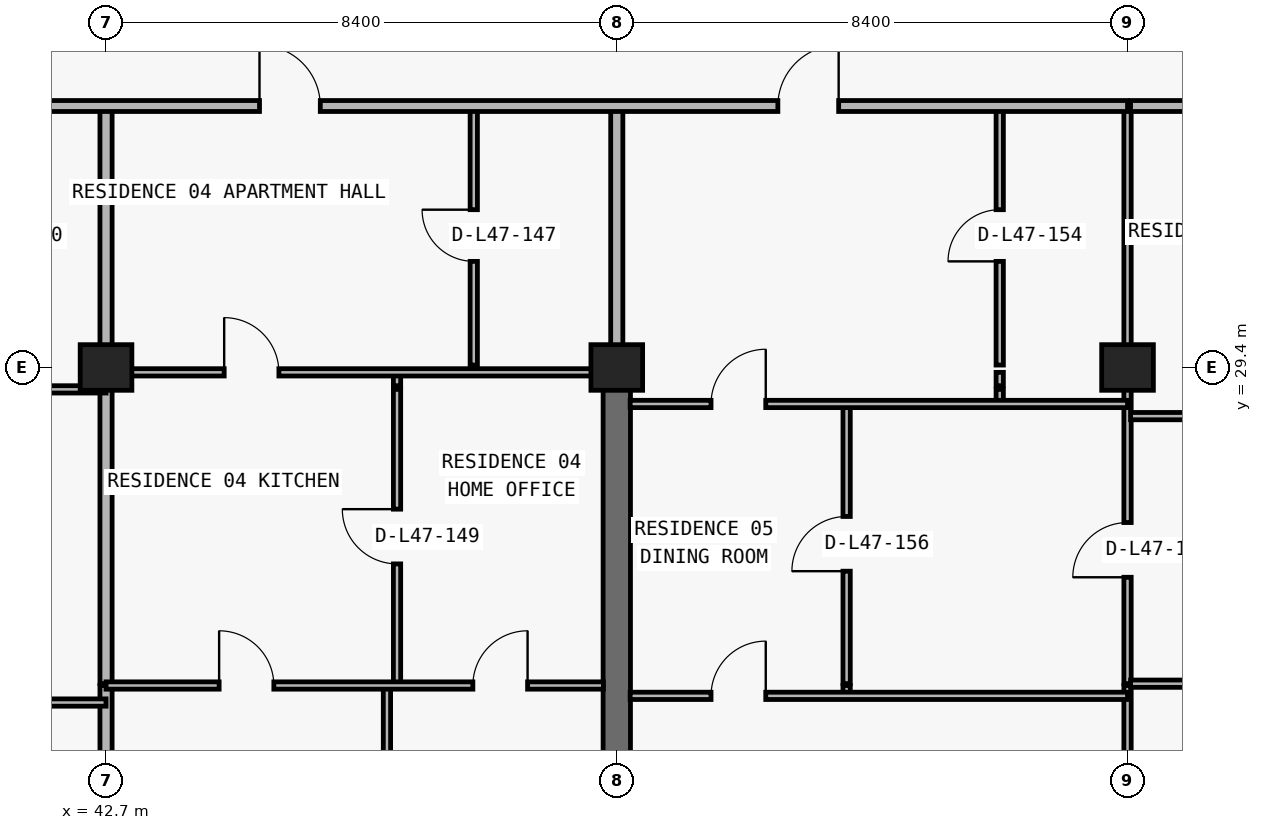
"""IFC4 building model, lengths in metres.
Left out: names, types, materials, properties, quantities, classifications, styles, units other than length and angle.
Written with IfcOpenShell. Run it as: python <this file> out.ifc"""

import sys

from ifc_helpers import new_model, si_unit, direction, frame, frame_2d, origin, origin_2d, place, context, subcontext, project, spatial, rectangle, extrude, element, fill, save


model = new_model("IFC4")
c1 = context("Model", 3, precision=1e-05, world=origin(), true_north=direction((0.0, 1.0)))
c2 = subcontext(c1, "Body", "Model", "MODEL_VIEW")
j1 = project(units=[si_unit("LENGTHUNIT", "METRE"), si_unit("PLANEANGLEUNIT", "RADIAN")], contexts=[c1])
p1 = place(None, origin())
s1 = spatial("IfcSite", under=j1, at=p1, CompositionType="ELEMENT")
p2 = place(p1, origin())
s2 = spatial("IfcBuilding", under=s1, at=p2, CompositionType="ELEMENT")
p3 = place(p2, frame((0.0, 0.0, 170.4)))
s3 = spatial("IfcBuildingStorey", under=s2, at=p3, CompositionType="ELEMENT", Elevation=170.4)
for number, where, z_axis, x_axis in (
    (1, (42.7, 29.4, 0.0), (0.0, 0.0, 1.0), (1.0, 0.0, 0.0)),
    (2, (51.1, 29.4, 0.0), (0.0, 0.0, 1.0), (1.0, 0.0, 0.0)),
    (3, (59.5, 29.4, 0.0), (0.0, 0.0, 1.0), (1.0, 0.0, 0.0)),
):
    element("IfcColumn", number, at=place(p3, frame(where, z_axis=z_axis, x_axis=x_axis)), inside=s3, PredefinedType="COLUMN", context=c2, shape_type="SweptSolid", body=[
        extrude(rectangle(XDim=0.85, YDim=0.75, at=origin_2d()), origin(), (0.0, 0.0, 1.0), 3.05),
    ])
p4 = place(p3, frame((51.1, 20.8, 0.0), z_axis=(0.0, 0.0, 1.0), x_axis=(0.0, 1.0, 0.0)))
e4 = element("IfcWall", 4, at=p4, inside=s3, PredefinedType="SHEAR", context=c2, shape_type="SweptSolid", body=[
    extrude(rectangle(XDim=8.6, YDim=0.45, at=frame_2d((4.3, 0.0))), origin(), (0.0, 0.0, 1.0), 3.05),
])
p5 = place(p3, frame((42.7, 11.24, 0.0), z_axis=(0.0, 0.0, 1.0), x_axis=(0.0, 1.0, 0.0)))
e5 = element("IfcWall", 5, at=p5, inside=s3, PredefinedType="PARTITIONING", context=c2, shape_type="SweptSolid", body=[
    extrude(rectangle(XDim=12.93, YDim=0.2, at=frame_2d((6.465, 0.0))), origin(), (0.0, 0.0, 1.0), 2.263),
])
p6 = place(p3, frame((42.7, 24.2, 0.0), z_axis=(0.0, 0.0, 1.0), x_axis=(0.0, 1.0, 0.0)))
e6 = element("IfcWall", 6, at=p6, inside=s3, PredefinedType="PARTITIONING", context=c2, shape_type="SweptSolid", body=[
    extrude(rectangle(XDim=4.84, YDim=0.2, at=frame_2d((2.42, 0.0))), origin(), (0.0, 0.0, 1.0), 2.263),
])
p7 = place(p3, frame((42.7, 29.1, 0.0), z_axis=(0.0, 0.0, 1.0), x_axis=(0.0, 1.0, 0.0)))
e7 = element("IfcWall", 7, at=p7, inside=s3, PredefinedType="PARTITIONING", context=c2, shape_type="SweptSolid", body=[
    extrude(rectangle(XDim=0.22, YDim=0.2, at=frame_2d((0.11, 0.0))), origin(), (0.0, 0.0, 1.0), 3.05),
])
p8 = place(p3, frame((42.7, 29.44, 0.0), z_axis=(0.0, 0.0, 1.0), x_axis=(0.0, 1.0, 0.0)))
e8 = element("IfcWall", 8, at=p8, inside=s3, PredefinedType="PARTITIONING", context=c2, shape_type="SweptSolid", body=[
    extrude(rectangle(XDim=4.26, YDim=0.2, at=frame_2d((2.13, 0.0))), origin(), (0.0, 0.0, 1.0), 2.263),
])
p9 = place(p3, frame((47.32, 11.24, 0.0), z_axis=(0.0, 0.0, 1.0), x_axis=(0.0, 1.0, 0.0)))
e9 = element("IfcWall", 9, at=p9, inside=s3, PredefinedType="PARTITIONING", context=c2, shape_type="SweptSolid", body=[
    extrude(rectangle(XDim=12.93, YDim=0.12, at=frame_2d((6.465, 0.0))), origin(), (0.0, 0.0, 1.0), 3.05),
])
p10 = place(p3, frame((47.486, 24.2, 0.0), z_axis=(0.0, 0.0, 1.0), x_axis=(0.0, 1.0, 0.0)))
e10 = element("IfcWall", 10, at=p10, inside=s3, PredefinedType="PARTITIONING", context=c2, shape_type="SweptSolid", body=[
    extrude(rectangle(XDim=4.84, YDim=0.12, at=frame_2d((2.42, 0.0))), origin(), (0.0, 0.0, 1.0), 3.05),
])
p11 = place(p10, frame((1.97, 0.0, 0.0)))
e11 = element("IfcOpeningElement", 11, at=p11, cuts=e10, PredefinedType="OPENING", context=c2, shape_type="SweptSolid", body=[
    extrude(rectangle(XDim=0.9, YDim=2.15, at=frame_2d((0.45, 1.075))), frame((0.0, 0.07, 0.0), z_axis=(0.0, -1.0, 0.0), x_axis=(1.0, 0.0, 0.0)), (0.0, 0.0, 1.0), 0.14),
])
p12 = place(p3, frame((47.486, 29.1, 0.0), z_axis=(0.0, 0.0, 1.0), x_axis=(0.0, 1.0, 0.0)))
e12 = element("IfcWall", 12, at=p12, inside=s3, PredefinedType="PARTITIONING", context=c2, shape_type="SweptSolid", body=[
    extrude(rectangle(XDim=0.22, YDim=0.12, at=frame_2d((0.11, 0.0))), origin(), (0.0, 0.0, 1.0), 3.05),
])
p13 = place(p3, frame((48.748, 29.44, 0.0), z_axis=(0.0, 0.0, 1.0), x_axis=(0.0, 1.0, 0.0)))
e13 = element("IfcWall", 13, at=p13, inside=s3, PredefinedType="PARTITIONING", context=c2, shape_type="SweptSolid", body=[
    extrude(rectangle(XDim=4.26, YDim=0.12, at=frame_2d((2.13, 0.0))), origin(), (0.0, 0.0, 1.0), 3.05),
])
p14 = place(p13, frame((1.705, 0.0, 0.0)))
e14 = element("IfcOpeningElement", 14, at=p14, cuts=e13, PredefinedType="OPENING", context=c2, shape_type="SweptSolid", body=[
    extrude(rectangle(XDim=0.85, YDim=2.1, at=frame_2d((0.425, 1.05))), frame((0.0, 0.07, 0.0), z_axis=(0.0, -1.0, 0.0), x_axis=(1.0, 0.0, 0.0)), (0.0, 0.0, 1.0), 0.14),
])
p15 = place(p3, frame((51.1, 29.44, 0.0), z_axis=(0.0, 0.0, 1.0), x_axis=(0.0, 1.0, 0.0)))
e15 = element("IfcWall", 15, at=p15, inside=s3, PredefinedType="PARTITIONING", context=c2, shape_type="SweptSolid", body=[
    extrude(rectangle(XDim=4.26, YDim=0.2, at=frame_2d((2.13, 0.0))), origin(), (0.0, 0.0, 1.0), 2.335),
])
p16 = place(p3, frame((54.88, 24.0, 0.0), z_axis=(0.0, 0.0, 1.0), x_axis=(0.0, 1.0, 0.0)))
e16 = element("IfcWall", 16, at=p16, inside=s3, PredefinedType="PARTITIONING", context=c2, shape_type="SweptSolid", body=[
    extrude(rectangle(XDim=0.17, YDim=0.12, at=frame_2d((0.085, 0.0))), origin(), (0.0, 0.0, 1.0), 3.05),
])
p17 = place(p3, frame((54.88, 24.2, 0.0), z_axis=(0.0, 0.0, 1.0), x_axis=(0.0, 1.0, 0.0)))
e17 = element("IfcWall", 17, at=p17, inside=s3, PredefinedType="PARTITIONING", context=c2, shape_type="SweptSolid", body=[
    extrude(rectangle(XDim=4.6, YDim=0.12, at=frame_2d((2.3, 0.0))), origin(), (0.0, 0.0, 1.0), 3.05),
])
p18 = place(p17, frame((1.85, 0.0, 0.0)))
e18 = element("IfcOpeningElement", 18, at=p18, cuts=e17, PredefinedType="OPENING", context=c2, shape_type="SweptSolid", body=[
    extrude(rectangle(XDim=0.9, YDim=2.15, at=frame_2d((0.45, 1.075))), frame((0.0, 0.07, 0.0), z_axis=(0.0, -1.0, 0.0), x_axis=(1.0, 0.0, 0.0)), (0.0, 0.0, 1.0), 0.14),
])
p19 = place(p3, frame((57.398, 28.8, 0.0), z_axis=(0.0, 0.0, 1.0), x_axis=(0.0, 1.0, 0.0)))
e19 = element("IfcWall", 19, at=p19, inside=s3, PredefinedType="PARTITIONING", context=c2, shape_type="SweptSolid", body=[
    extrude(rectangle(XDim=0.24, YDim=0.12, at=frame_2d((0.12, 0.0))), origin(), (0.0, 0.0, 1.0), 3.05),
])
p20 = place(p3, frame((57.398, 29.1, 0.0), z_axis=(0.0, 0.0, 1.0), x_axis=(0.0, 1.0, 0.0)))
e20 = element("IfcWall", 20, at=p20, inside=s3, PredefinedType="PARTITIONING", context=c2, shape_type="SweptSolid", body=[
    extrude(rectangle(XDim=0.22, YDim=0.12, at=frame_2d((0.11, 0.0))), origin(), (0.0, 0.0, 1.0), 3.05),
])
p21 = place(p3, frame((57.398, 29.44, 0.0), z_axis=(0.0, 0.0, 1.0), x_axis=(0.0, 1.0, 0.0)))
e21 = element("IfcWall", 21, at=p21, inside=s3, PredefinedType="PARTITIONING", context=c2, shape_type="SweptSolid", body=[
    extrude(rectangle(XDim=4.26, YDim=0.12, at=frame_2d((2.13, 0.0))), origin(), (0.0, 0.0, 1.0), 3.05),
])
p22 = place(p21, frame((1.705, 0.0, 0.0)))
e22 = element("IfcOpeningElement", 22, at=p22, cuts=e21, PredefinedType="OPENING", context=c2, shape_type="SweptSolid", body=[
    extrude(rectangle(XDim=0.85, YDim=2.1, at=frame_2d((0.425, 1.05))), frame((0.0, 0.07, 0.0), z_axis=(0.0, -1.0, 0.0), x_axis=(1.0, 0.0, 0.0)), (0.0, 0.0, 1.0), 0.14),
])
p23 = place(p3, frame((59.5, 11.24, 0.0), z_axis=(0.0, 0.0, 1.0), x_axis=(0.0, 1.0, 0.0)))
e23 = element("IfcWall", 23, at=p23, inside=s3, PredefinedType="PARTITIONING", context=c2, shape_type="SweptSolid", body=[
    extrude(rectangle(XDim=12.93, YDim=0.12, at=frame_2d((6.465, 0.0))), origin(), (0.0, 0.0, 1.0), 2.263),
])
p24 = place(p3, frame((59.5, 24.2, 0.0), z_axis=(0.0, 0.0, 1.0), x_axis=(0.0, 1.0, 0.0)))
e24 = element("IfcWall", 24, at=p24, inside=s3, PredefinedType="PARTITIONING", context=c2, shape_type="SweptSolid", body=[
    extrude(rectangle(XDim=4.84, YDim=0.12, at=frame_2d((2.42, 0.0))), origin(), (0.0, 0.0, 1.0), 2.263),
])
p25 = place(p24, frame((1.75, 0.0, 0.0)))
e25 = element("IfcOpeningElement", 25, at=p25, cuts=e24, PredefinedType="OPENING", context=c2, shape_type="SweptSolid", body=[
    extrude(rectangle(XDim=0.9, YDim=2.15, at=frame_2d((0.45, 1.075))), frame((0.0, 0.07, 0.0), z_axis=(0.0, -1.0, 0.0), x_axis=(1.0, 0.0, 0.0)), (0.0, 0.0, 1.0), 0.14),
])
p26 = place(p3, frame((59.5, 29.1, 0.0), z_axis=(0.0, 0.0, 1.0), x_axis=(0.0, 1.0, 0.0)))
e26 = element("IfcWall", 26, at=p26, inside=s3, PredefinedType="PARTITIONING", context=c2, shape_type="SweptSolid", body=[
    extrude(rectangle(XDim=0.22, YDim=0.12, at=frame_2d((0.11, 0.0))), origin(), (0.0, 0.0, 1.0), 3.05),
])
p27 = place(p3, frame((59.5, 29.44, 0.0), z_axis=(0.0, 0.0, 1.0), x_axis=(0.0, 1.0, 0.0)))
e27 = element("IfcWall", 27, at=p27, inside=s3, PredefinedType="PARTITIONING", context=c2, shape_type="SweptSolid", body=[
    extrude(rectangle(XDim=4.26, YDim=0.12, at=frame_2d((2.13, 0.0))), origin(), (0.0, 0.0, 1.0), 2.263),
])
p28 = place(p3, frame((35.1, 23.89, 0.0), z_axis=(0.0, 0.0, 1.0), x_axis=(1.0, 0.0, 0.0)))
e28 = element("IfcWall", 28, at=p28, inside=s3, PredefinedType="PARTITIONING", context=c2, shape_type="SweptSolid", body=[
    extrude(rectangle(XDim=7.6, YDim=0.12, at=frame_2d((3.8, 0.0))), origin(), (0.0, 0.0, 1.0), 3.05),
])
p29 = place(p28, frame((1.336, 0.0, 0.0)))
e29 = element("IfcOpeningElement", 29, at=p29, cuts=e28, PredefinedType="OPENING", context=c2, shape_type="SweptSolid", body=[
    extrude(rectangle(XDim=0.9, YDim=2.15, at=frame_2d((0.45, 1.075))), frame((0.0, 0.07, 0.0), z_axis=(0.0, -1.0, 0.0), x_axis=(1.0, 0.0, 0.0)), (0.0, 0.0, 1.0), 0.14),
])
p30 = place(p28, frame((5.402, 0.0, 0.0)))
e30 = element("IfcOpeningElement", 30, at=p30, cuts=e28, PredefinedType="OPENING", context=c2, shape_type="SweptSolid", body=[
    extrude(rectangle(XDim=0.9, YDim=2.15, at=frame_2d((0.45, 1.075))), frame((0.0, 0.07, 0.0), z_axis=(0.0, -1.0, 0.0), x_axis=(1.0, 0.0, 0.0)), (0.0, 0.0, 1.0), 0.14),
])
p31 = place(p3, frame((51.32, 24.0, 0.0), z_axis=(0.0, 0.0, 1.0), x_axis=(1.0, 0.0, 0.0)))
e31 = element("IfcWall", 31, at=p31, inside=s3, PredefinedType="PARTITIONING", context=c2, shape_type="SweptSolid", body=[
    extrude(rectangle(XDim=8.18, YDim=0.12, at=frame_2d((4.09, 0.0))), origin(), (0.0, 0.0, 1.0), 3.05),
])
p32 = place(p31, frame((1.33, 0.0, 0.0)))
e32 = element("IfcOpeningElement", 32, at=p32, cuts=e31, PredefinedType="OPENING", context=c2, shape_type="SweptSolid", body=[
    extrude(rectangle(XDim=0.9, YDim=2.15, at=frame_2d((0.45, 1.075))), frame((0.0, 0.07, 0.0), z_axis=(0.0, -1.0, 0.0), x_axis=(1.0, 0.0, 0.0)), (0.0, 0.0, 1.0), 0.14),
])
p33 = place(p3, frame((42.7, 24.17, 0.0), z_axis=(0.0, 0.0, 1.0), x_axis=(1.0, 0.0, 0.0)))
e33 = element("IfcWall", 33, at=p33, inside=s3, PredefinedType="PARTITIONING", context=c2, shape_type="SweptSolid", body=[
    extrude(rectangle(XDim=8.18, YDim=0.12, at=frame_2d((4.09, 0.0))), origin(), (0.0, 0.0, 1.0), 3.05),
])
p34 = place(p33, frame((1.86, 0.0, 0.0)))
e34 = element("IfcOpeningElement", 34, at=p34, cuts=e33, PredefinedType="OPENING", context=c2, shape_type="SweptSolid", body=[
    extrude(rectangle(XDim=0.9, YDim=2.15, at=frame_2d((0.45, 1.075))), frame((0.0, 0.07, 0.0), z_axis=(0.0, -1.0, 0.0), x_axis=(1.0, 0.0, 0.0)), (0.0, 0.0, 1.0), 0.14),
])
p35 = place(p33, frame((6.033, 0.0, 0.0)))
e35 = element("IfcOpeningElement", 35, at=p35, cuts=e33, PredefinedType="OPENING", context=c2, shape_type="SweptSolid", body=[
    extrude(rectangle(XDim=0.9, YDim=2.15, at=frame_2d((0.45, 1.075))), frame((0.0, 0.07, 0.0), z_axis=(0.0, -1.0, 0.0), x_axis=(1.0, 0.0, 0.0)), (0.0, 0.0, 1.0), 0.14),
])
p36 = place(p3, frame((59.55, 24.2, 0.0), z_axis=(0.0, 0.0, 1.0), x_axis=(1.0, 0.0, 0.0)))
e36 = element("IfcWall", 36, at=p36, inside=s3, PredefinedType="PARTITIONING", context=c2, shape_type="SweptSolid", body=[
    extrude(rectangle(XDim=8.15, YDim=0.12, at=frame_2d((4.075, 0.0))), origin(), (0.0, 0.0, 1.0), 3.05),
])
p37 = place(p36, frame((3.625, 0.0, 0.0)))
e37 = element("IfcOpeningElement", 37, at=p37, cuts=e36, PredefinedType="OPENING", context=c2, shape_type="SweptSolid", body=[
    extrude(rectangle(XDim=0.9, YDim=2.15, at=frame_2d((0.45, 1.075))), frame((0.0, 0.07, 0.0), z_axis=(0.0, -1.0, 0.0), x_axis=(1.0, 0.0, 0.0)), (0.0, 0.0, 1.0), 0.14),
])
p38 = place(p3, frame((59.55, 28.6, 0.0), z_axis=(0.0, 0.0, 1.0), x_axis=(1.0, 0.0, 0.0)))
e38 = element("IfcWall", 38, at=p38, inside=s3, PredefinedType="PARTITIONING", context=c2, shape_type="SweptSolid", body=[
    extrude(rectangle(XDim=8.15, YDim=0.12, at=frame_2d((4.075, 0.0))), origin(), (0.0, 0.0, 1.0), 3.05),
])
p39 = place(p38, frame((2.684, 0.0, 0.0)))
e39 = element("IfcOpeningElement", 39, at=p39, cuts=e38, PredefinedType="OPENING", context=c2, shape_type="SweptSolid", body=[
    extrude(rectangle(XDim=0.9, YDim=2.15, at=frame_2d((0.45, 1.075))), frame((0.0, 0.07, 0.0), z_axis=(0.0, -1.0, 0.0), x_axis=(1.0, 0.0, 0.0)), (0.0, 0.0, 1.0), 0.14),
])
p40 = place(p3, frame((51.32, 28.8, 0.0), z_axis=(0.0, 0.0, 1.0), x_axis=(1.0, 0.0, 0.0)))
e40 = element("IfcWall", 40, at=p40, inside=s3, PredefinedType="PARTITIONING", context=c2, shape_type="SweptSolid", body=[
    extrude(rectangle(XDim=8.18, YDim=0.12, at=frame_2d((4.09, 0.0))), origin(), (0.0, 0.0, 1.0), 3.05),
])
p41 = place(p40, frame((1.33, 0.0, 0.0)))
e41 = element("IfcOpeningElement", 41, at=p41, cuts=e40, PredefinedType="OPENING", context=c2, shape_type="SweptSolid", body=[
    extrude(rectangle(XDim=0.9, YDim=2.15, at=frame_2d((0.45, 1.075))), frame((0.0, 0.07, 0.0), z_axis=(0.0, -1.0, 0.0), x_axis=(1.0, 0.0, 0.0)), (0.0, 0.0, 1.0), 0.14),
])
p42 = place(p3, frame((35.1, 29.04, 0.0), z_axis=(0.0, 0.0, 1.0), x_axis=(1.0, 0.0, 0.0)))
e42 = element("IfcWall", 42, at=p42, inside=s3, PredefinedType="PARTITIONING", context=c2, shape_type="SweptSolid", body=[
    extrude(rectangle(XDim=7.6, YDim=0.12, at=frame_2d((3.8, 0.0))), origin(), (0.0, 0.0, 1.0), 3.05),
])
p43 = place(p42, frame((1.602, 0.0, 0.0)))
e43 = element("IfcOpeningElement", 43, at=p43, cuts=e42, PredefinedType="OPENING", context=c2, shape_type="SweptSolid", body=[
    extrude(rectangle(XDim=0.9, YDim=2.15, at=frame_2d((0.45, 1.075))), frame((0.0, 0.07, 0.0), z_axis=(0.0, -1.0, 0.0), x_axis=(1.0, 0.0, 0.0)), (0.0, 0.0, 1.0), 0.14),
])
p44 = place(p3, frame((42.7, 29.32, 0.0), z_axis=(0.0, 0.0, 1.0), x_axis=(1.0, 0.0, 0.0)))
e44 = element("IfcWall", 44, at=p44, inside=s3, PredefinedType="PARTITIONING", context=c2, shape_type="SweptSolid", body=[
    extrude(rectangle(XDim=8.18, YDim=0.12, at=frame_2d((4.09, 0.0))), origin(), (0.0, 0.0, 1.0), 2.263),
])
p45 = place(p44, frame((1.943, 0.0, 0.0)))
e45 = element("IfcOpeningElement", 45, at=p45, cuts=e44, PredefinedType="OPENING", context=c2, shape_type="SweptSolid", body=[
    extrude(rectangle(XDim=0.9, YDim=2.15, at=frame_2d((0.45, 1.075))), frame((0.0, 0.07, 0.0), z_axis=(0.0, -1.0, 0.0), x_axis=(1.0, 0.0, 0.0)), (0.0, 0.0, 1.0), 0.14),
])
p46 = place(p3, frame((31.4, 33.7, 0.0), z_axis=(0.0, 0.0, 1.0), x_axis=(1.0, 0.0, 0.0)))
e46 = element("IfcWall", 46, at=p46, inside=s3, PredefinedType="PARTITIONING", context=c2, shape_type="SweptSolid", body=[
    extrude(rectangle(XDim=28.1, YDim=0.18, at=frame_2d((14.05, 0.0))), origin(), (0.0, 0.0, 1.0), 3.05),
])
p47 = place(p46, frame((5.97, 0.0, 0.0)))
e47 = element("IfcOpeningElement", 47, at=p47, cuts=e46, PredefinedType="OPENING", context=c2, shape_type="SweptSolid", body=[
    extrude(rectangle(XDim=1.0, YDim=2.2, at=frame_2d((0.5, 1.1))), frame((0.0, 0.1, 0.0), z_axis=(0.0, -1.0, 0.0), x_axis=(1.0, 0.0, 0.0)), (0.0, 0.0, 1.0), 0.2),
])
p48 = place(p46, frame((13.824, 0.0, 0.0)))
e48 = element("IfcOpeningElement", 48, at=p48, cuts=e46, PredefinedType="OPENING", context=c2, shape_type="SweptSolid", body=[
    extrude(rectangle(XDim=1.0, YDim=2.2, at=frame_2d((0.5, 1.1))), frame((0.0, 0.1, 0.0), z_axis=(0.0, -1.0, 0.0), x_axis=(1.0, 0.0, 0.0)), (0.0, 0.0, 1.0), 0.2),
])
p49 = place(p46, frame((22.349, 0.0, 0.0)))
e49 = element("IfcOpeningElement", 49, at=p49, cuts=e46, PredefinedType="OPENING", context=c2, shape_type="SweptSolid", body=[
    extrude(rectangle(XDim=1.0, YDim=2.2, at=frame_2d((0.5, 1.1))), frame((0.0, 0.1, 0.0), z_axis=(0.0, -1.0, 0.0), x_axis=(1.0, 0.0, 0.0)), (0.0, 0.0, 1.0), 0.2),
])
p50 = place(p3, frame((59.55, 33.7, 0.0), z_axis=(0.0, 0.0, 1.0), x_axis=(1.0, 0.0, 0.0)))
e50 = element("IfcWall", 50, at=p50, inside=s3, PredefinedType="PARTITIONING", context=c2, shape_type="SweptSolid", body=[
    extrude(rectangle(XDim=8.15, YDim=0.18, at=frame_2d((4.075, 0.0))), origin(), (0.0, 0.0, 1.0), 3.05),
])
p51 = place(p48, origin())
e51 = element("IfcDoor", 51, at=p51, inside=s3, OperationType="SINGLE_SWING_LEFT", PredefinedType="DOOR", context=c2, shape_type="SweptSolid", body=[
    extrude(rectangle(XDim=1.0, YDim=2.2, at=frame_2d((0.5, 1.1))), frame((0.0, 0.025, 0.0), z_axis=(0.0, -1.0, 0.0), x_axis=(1.0, 0.0, 0.0)), (0.0, 0.0, 1.0), 0.05),
])
fill(e48, e51)
p52 = place(p14, origin())
e52 = element("IfcDoor", 52, at=p52, inside=s3, OperationType="SINGLE_SWING_RIGHT", PredefinedType="DOOR", context=c2, shape_type="SweptSolid", body=[
    extrude(rectangle(XDim=0.85, YDim=2.1, at=frame_2d((0.425, 1.05))), frame((0.0, 0.025, 0.0), z_axis=(0.0, -1.0, 0.0), x_axis=(1.0, 0.0, 0.0)), (0.0, 0.0, 1.0), 0.05),
])
fill(e14, e52)
p53 = place(p45, origin())
e53 = element("IfcDoor", 53, at=p53, inside=s3, OperationType="SINGLE_SWING_LEFT", PredefinedType="DOOR", context=c2, shape_type="SweptSolid", body=[
    extrude(rectangle(XDim=0.9, YDim=2.15, at=frame_2d((0.45, 1.075))), frame((0.0, 0.025, 0.0), z_axis=(0.0, -1.0, 0.0), x_axis=(1.0, 0.0, 0.0)), (0.0, 0.0, 1.0), 0.05),
])
fill(e45, e53)
p54 = place(p11, origin())
e54 = element("IfcDoor", 54, at=p54, inside=s3, OperationType="SINGLE_SWING_RIGHT", PredefinedType="DOOR", context=c2, shape_type="SweptSolid", body=[
    extrude(rectangle(XDim=0.9, YDim=2.15, at=frame_2d((0.45, 1.075))), frame((0.0, 0.025, 0.0), z_axis=(0.0, -1.0, 0.0), x_axis=(1.0, 0.0, 0.0)), (0.0, 0.0, 1.0), 0.05),
])
fill(e11, e54)
p55 = place(p34, origin())
e55 = element("IfcDoor", 55, at=p55, inside=s3, OperationType="SINGLE_SWING_LEFT", PredefinedType="DOOR", context=c2, shape_type="SweptSolid", body=[
    extrude(rectangle(XDim=0.9, YDim=2.15, at=frame_2d((0.45, 1.075))), frame((0.0, 0.025, 0.0), z_axis=(0.0, -1.0, 0.0), x_axis=(1.0, 0.0, 0.0)), (0.0, 0.0, 1.0), 0.05),
])
fill(e34, e55)
p56 = place(p35, origin())
e56 = element("IfcDoor", 56, at=p56, inside=s3, OperationType="SINGLE_SWING_RIGHT", PredefinedType="DOOR", context=c2, shape_type="SweptSolid", body=[
    extrude(rectangle(XDim=0.9, YDim=2.15, at=frame_2d((0.45, 1.075))), frame((0.0, 0.025, 0.0), z_axis=(0.0, -1.0, 0.0), x_axis=(1.0, 0.0, 0.0)), (0.0, 0.0, 1.0), 0.05),
])
fill(e35, e56)
p57 = place(p49, origin())
e57 = element("IfcDoor", 57, at=p57, inside=s3, OperationType="SINGLE_SWING_RIGHT", PredefinedType="DOOR", context=c2, shape_type="SweptSolid", body=[
    extrude(rectangle(XDim=1.0, YDim=2.2, at=frame_2d((0.5, 1.1))), frame((0.0, 0.025, 0.0), z_axis=(0.0, -1.0, 0.0), x_axis=(1.0, 0.0, 0.0)), (0.0, 0.0, 1.0), 0.05),
])
fill(e49, e57)
p58 = place(p22, origin())
e58 = element("IfcDoor", 58, at=p58, inside=s3, OperationType="SINGLE_SWING_LEFT", PredefinedType="DOOR", context=c2, shape_type="SweptSolid", body=[
    extrude(rectangle(XDim=0.85, YDim=2.1, at=frame_2d((0.425, 1.05))), frame((0.0, 0.025, 0.0), z_axis=(0.0, -1.0, 0.0), x_axis=(1.0, 0.0, 0.0)), (0.0, 0.0, 1.0), 0.05),
])
fill(e22, e58)
p59 = place(p41, origin())
e59 = element("IfcDoor", 59, at=p59, inside=s3, OperationType="SINGLE_SWING_RIGHT", PredefinedType="DOOR", context=c2, shape_type="SweptSolid", body=[
    extrude(rectangle(XDim=0.9, YDim=2.15, at=frame_2d((0.45, 1.075))), frame((0.0, 0.025, 0.0), z_axis=(0.0, -1.0, 0.0), x_axis=(1.0, 0.0, 0.0)), (0.0, 0.0, 1.0), 0.05),
])
fill(e41, e59)
p60 = place(p18, origin())
e60 = element("IfcDoor", 60, at=p60, inside=s3, OperationType="SINGLE_SWING_LEFT", PredefinedType="DOOR", context=c2, shape_type="SweptSolid", body=[
    extrude(rectangle(XDim=0.9, YDim=2.15, at=frame_2d((0.45, 1.075))), frame((0.0, 0.025, 0.0), z_axis=(0.0, -1.0, 0.0), x_axis=(1.0, 0.0, 0.0)), (0.0, 0.0, 1.0), 0.05),
])
fill(e18, e60)
p61 = place(p32, origin())
e61 = element("IfcDoor", 61, at=p61, inside=s3, OperationType="SINGLE_SWING_RIGHT", PredefinedType="DOOR", context=c2, shape_type="SweptSolid", body=[
    extrude(rectangle(XDim=0.9, YDim=2.15, at=frame_2d((0.45, 1.075))), frame((0.0, 0.025, 0.0), z_axis=(0.0, -1.0, 0.0), x_axis=(1.0, 0.0, 0.0)), (0.0, 0.0, 1.0), 0.05),
])
fill(e32, e61)
p62 = place(p25, origin())
e62 = element("IfcDoor", 62, at=p62, inside=s3, OperationType="SINGLE_SWING_LEFT", PredefinedType="DOOR", context=c2, shape_type="SweptSolid", body=[
    extrude(rectangle(XDim=0.9, YDim=2.15, at=frame_2d((0.45, 1.075))), frame((0.0, 0.025, 0.0), z_axis=(0.0, -1.0, 0.0), x_axis=(1.0, 0.0, 0.0)), (0.0, 0.0, 1.0), 0.05),
])
fill(e25, e62)
save(model, sys.argv[1])
